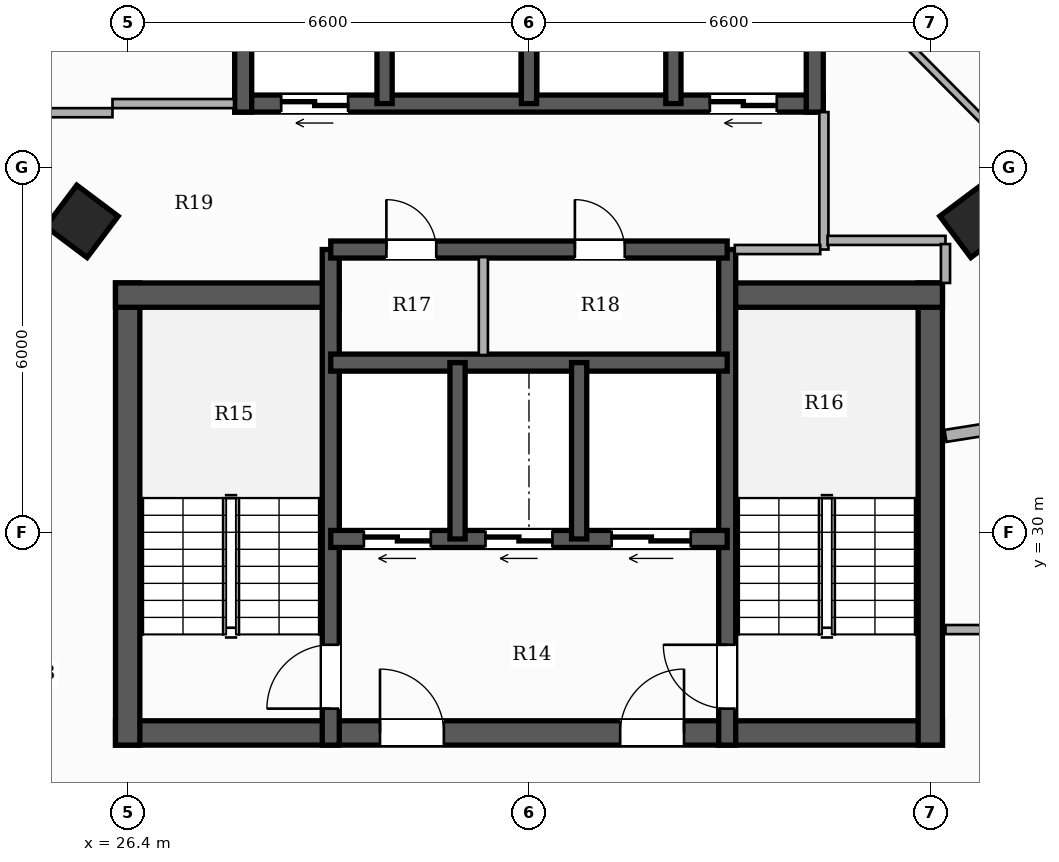
"""IFC4 building model, lengths in metres.
Left out: names, types, materials, properties, quantities, classifications, styles, units other than length and angle.
Written with IfcOpenShell. Run it as: python <this file> out.ifc"""

import sys

from ifc_helpers import new_model, si_unit, direction, frame, frame_2d, origin, origin_2d, place, context, subcontext, project, spatial, rectangle, hollow_rectangle, extrude, element, fill, save


model = new_model("IFC4")
c1 = context("Model", 3, precision=1e-05, world=origin(), true_north=direction((0.0, 1.0)))
c2 = subcontext(c1, "Body", "Model", "MODEL_VIEW")
j1 = project(units=[si_unit("LENGTHUNIT", "METRE"), si_unit("PLANEANGLEUNIT", "RADIAN")], contexts=[c1])
p1 = place(None, origin())
s1 = spatial("IfcSite", under=j1, at=p1, CompositionType="ELEMENT")
p2 = place(p1, origin())
s2 = spatial("IfcBuilding", under=s1, at=p2, CompositionType="ELEMENT")
p3 = place(p2, frame((0.0, 0.0, 119.9)))
s3 = spatial("IfcBuildingStorey", under=s2, at=p3, CompositionType="ELEMENT", Elevation=119.9)
p4 = place(p3, frame((26.2, 26.7, 0.0), z_axis=(0.0, 0.0, 1.0), x_axis=(1.0, 0.0, 0.0)))
e1 = element("IfcWall", 1, at=p4, inside=s3, PredefinedType="SHEAR", context=c2, shape_type="SweptSolid", body=[
    extrude(rectangle(XDim=13.6, YDim=0.4, at=frame_2d((6.8, 0.0))), origin(), (0.0, 0.0, 1.0), 3.3),
])
p5 = place(p4, frame((4.35, 0.0, 0.0)))
e2 = element("IfcOpeningElement", 2, at=p5, cuts=e1, PredefinedType="OPENING", context=c2, shape_type="SweptSolid", body=[
    extrude(rectangle(XDim=1.05, YDim=2.15, at=frame_2d((0.525, 1.075))), frame((0.0, 0.21, 0.0), z_axis=(0.0, -1.0, 0.0), x_axis=(1.0, 0.0, 0.0)), (0.0, 0.0, 1.0), 0.42),
])
p6 = place(p4, frame((8.3, 0.0, 0.0)))
e3 = element("IfcOpeningElement", 3, at=p6, cuts=e1, PredefinedType="OPENING", context=c2, shape_type="SweptSolid", body=[
    extrude(rectangle(XDim=1.05, YDim=2.15, at=frame_2d((0.525, 1.075))), frame((0.0, 0.21, 0.0), z_axis=(0.0, -1.0, 0.0), x_axis=(1.0, 0.0, 0.0)), (0.0, 0.0, 1.0), 0.42),
])
p7 = place(p3, frame((26.4, 26.5, 0.0), z_axis=(0.0, 0.0, 1.0), x_axis=(0.0, 1.0, 0.0)))
e4 = element("IfcWall", 4, at=p7, inside=s3, PredefinedType="SHEAR", context=c2, shape_type="SweptSolid", body=[
    extrude(rectangle(XDim=7.6, YDim=0.4, at=frame_2d((3.8, 0.0))), origin(), (0.0, 0.0, 1.0), 3.3),
])
p8 = place(p3, frame((26.2, 33.9, 0.0), z_axis=(0.0, 0.0, 1.0), x_axis=(1.0, 0.0, 0.0)))
e5 = element("IfcWall", 5, at=p8, inside=s3, PredefinedType="SHEAR", context=c2, shape_type="SweptSolid", body=[
    extrude(rectangle(XDim=3.68, YDim=0.4, at=frame_2d((1.84, 0.0))), origin(), (0.0, 0.0, 1.0), 3.3),
])
p9 = place(p3, frame((39.6, 26.5, 0.0), z_axis=(0.0, 0.0, 1.0), x_axis=(0.0, 1.0, 0.0)))
e6 = element("IfcWall", 6, at=p9, inside=s3, PredefinedType="SHEAR", context=c2, shape_type="SweptSolid", body=[
    extrude(rectangle(XDim=7.6, YDim=0.4, at=frame_2d((3.8, 0.0))), origin(), (0.0, 0.0, 1.0), 3.3),
])
p10 = place(p3, frame((36.12, 33.9, 0.0), z_axis=(0.0, 0.0, 1.0), x_axis=(1.0, 0.0, 0.0)))
e7 = element("IfcWall", 7, at=p10, inside=s3, PredefinedType="SHEAR", context=c2, shape_type="SweptSolid", body=[
    extrude(rectangle(XDim=3.68, YDim=0.4, at=frame_2d((1.84, 0.0))), origin(), (0.0, 0.0, 1.0), 3.3),
])
p11 = place(p3, frame((29.74, 26.5, 0.0), z_axis=(0.0, 0.0, 1.0), x_axis=(0.0, 1.0, 0.0)))
e8 = element("IfcWall", 8, at=p11, inside=s3, PredefinedType="SHEAR", context=c2, shape_type="SweptSolid", body=[
    extrude(rectangle(XDim=8.15, YDim=0.28, at=frame_2d((4.075, 0.0))), origin(), (0.0, 0.0, 1.0), 3.3),
])
p12 = place(p11, frame((0.6, 0.0, 0.0)))
e9 = element("IfcOpeningElement", 9, at=p12, cuts=e8, PredefinedType="OPENING", context=c2, shape_type="SweptSolid", body=[
    extrude(rectangle(XDim=1.05, YDim=2.15, at=frame_2d((0.525, 1.075))), frame((0.0, 0.15, 0.0), z_axis=(0.0, -1.0, 0.0), x_axis=(1.0, 0.0, 0.0)), (0.0, 0.0, 1.0), 0.3),
])
p13 = place(p3, frame((36.26, 26.5, 0.0), z_axis=(0.0, 0.0, 1.0), x_axis=(0.0, 1.0, 0.0)))
e10 = element("IfcWall", 10, at=p13, inside=s3, PredefinedType="SHEAR", context=c2, shape_type="SweptSolid", body=[
    extrude(rectangle(XDim=8.15, YDim=0.28, at=frame_2d((4.075, 0.0))), origin(), (0.0, 0.0, 1.0), 3.3),
])
p14 = place(p13, frame((0.6, 0.0, 0.0)))
e11 = element("IfcOpeningElement", 11, at=p14, cuts=e10, PredefinedType="OPENING", context=c2, shape_type="SweptSolid", body=[
    extrude(rectangle(XDim=1.05, YDim=2.15, at=frame_2d((0.525, 1.075))), frame((0.0, 0.15, 0.0), z_axis=(0.0, -1.0, 0.0), x_axis=(1.0, 0.0, 0.0)), (0.0, 0.0, 1.0), 0.3),
])
p15 = place(p3, frame((36.26, 29.89, 0.0), z_axis=(0.0, 0.0, 1.0), x_axis=(-1.0, 0.0, 0.0)))
e12 = element("IfcWall", 12, at=p15, inside=s3, PredefinedType="SHEAR", context=c2, shape_type="SweptSolid", body=[
    extrude(rectangle(XDim=6.52, YDim=0.28, at=frame_2d((3.26, 0.0))), origin(), (0.0, 0.0, 1.0), 3.3),
])
p16 = place(p15, frame((4.875, 0.0, 0.0)))
e13 = element("IfcOpeningElement", 13, at=p16, cuts=e12, PredefinedType="OPENING", context=c2, shape_type="SweptSolid", body=[
    extrude(rectangle(XDim=1.1, YDim=2.2, at=frame_2d((0.55, 1.1))), frame((0.0, 0.15, 0.0), z_axis=(0.0, -1.0, 0.0), x_axis=(1.0, 0.0, 0.0)), (0.0, 0.0, 1.0), 0.3),
])
p17 = place(p15, frame((2.875, 0.0, 0.0)))
e14 = element("IfcOpeningElement", 14, at=p17, cuts=e12, PredefinedType="OPENING", context=c2, shape_type="SweptSolid", body=[
    extrude(rectangle(XDim=1.1, YDim=2.2, at=frame_2d((0.55, 1.1))), frame((0.0, 0.15, 0.0), z_axis=(0.0, -1.0, 0.0), x_axis=(1.0, 0.0, 0.0)), (0.0, 0.0, 1.0), 0.3),
])
p18 = place(p15, frame((0.6, 0.0, 0.0)))
e15 = element("IfcOpeningElement", 15, at=p18, cuts=e12, PredefinedType="OPENING", context=c2, shape_type="SweptSolid", body=[
    extrude(rectangle(XDim=1.3, YDim=2.2, at=frame_2d((0.65, 1.1))), frame((0.0, 0.15, 0.0), z_axis=(0.0, -1.0, 0.0), x_axis=(1.0, 0.0, 0.0)), (0.0, 0.0, 1.0), 0.3),
])
p19 = place(p3, frame((29.74, 32.79, 0.0), z_axis=(0.0, 0.0, 1.0), x_axis=(1.0, 0.0, 0.0)))
e16 = element("IfcWall", 16, at=p19, inside=s3, PredefinedType="SHEAR", context=c2, shape_type="SweptSolid", body=[
    extrude(rectangle(XDim=6.52, YDim=0.28, at=frame_2d((3.26, 0.0))), origin(), (0.0, 0.0, 1.0), 3.3),
])
for number, where, z_axis, x_axis in (
    (17, (31.825, 29.89, 0.0), (0.0, 0.0, 1.0), (0.0, 1.0, 0.0)),
    (18, (33.825, 29.89, 0.0), (0.0, 0.0, 1.0), (0.0, 1.0, 0.0)),
):
    element("IfcWall", number, at=place(p3, frame(where, z_axis=z_axis, x_axis=x_axis)), inside=s3, PredefinedType="SHEAR", context=c2, shape_type="SweptSolid", body=[
        extrude(rectangle(XDim=2.9, YDim=0.25, at=frame_2d((1.45, 0.0))), origin(), (0.0, 0.0, 1.0), 3.3),
    ])
p20 = place(p3, frame((29.74, 34.65, 0.0), z_axis=(0.0, 0.0, 1.0), x_axis=(1.0, 0.0, 0.0)))
e19 = element("IfcWall", 19, at=p20, inside=s3, PredefinedType="SHEAR", context=c2, shape_type="SweptSolid", body=[
    extrude(rectangle(XDim=6.52, YDim=0.28, at=frame_2d((3.26, 0.0))), origin(), (0.0, 0.0, 1.0), 3.3),
])
p21 = place(p20, frame((0.915, 0.0, 0.0)))
e20 = element("IfcOpeningElement", 20, at=p21, cuts=e19, PredefinedType="OPENING", context=c2, shape_type="SweptSolid", body=[
    extrude(rectangle(XDim=0.82, YDim=2.1, at=frame_2d((0.41, 1.05))), frame((0.0, 0.15, 0.0), z_axis=(0.0, -1.0, 0.0), x_axis=(1.0, 0.0, 0.0)), (0.0, 0.0, 1.0), 0.3),
])
p22 = place(p20, frame((4.015, 0.0, 0.0)))
e21 = element("IfcOpeningElement", 21, at=p22, cuts=e19, PredefinedType="OPENING", context=c2, shape_type="SweptSolid", body=[
    extrude(rectangle(XDim=0.82, YDim=2.1, at=frame_2d((0.41, 1.05))), frame((0.0, 0.15, 0.0), z_axis=(0.0, -1.0, 0.0), x_axis=(1.0, 0.0, 0.0)), (0.0, 0.0, 1.0), 0.3),
])
p23 = place(p3, frame((37.84, 37.05, 0.0), z_axis=(0.0, 0.0, 1.0), x_axis=(-1.0, 0.0, 0.0)))
e22 = element("IfcWall", 22, at=p23, inside=s3, PredefinedType="SHEAR", context=c2, shape_type="SweptSolid", body=[
    extrude(rectangle(XDim=9.68, YDim=0.28, at=frame_2d((4.84, 0.0))), origin(), (0.0, 0.0, 1.0), 3.3),
])
p24 = place(p23, frame((7.815, 0.0, 0.0)))
e23 = element("IfcOpeningElement", 23, at=p24, cuts=e22, PredefinedType="OPENING", context=c2, shape_type="SweptSolid", body=[
    extrude(rectangle(XDim=1.1, YDim=2.2, at=frame_2d((0.55, 1.1))), frame((0.0, 0.15, 0.0), z_axis=(0.0, -1.0, 0.0), x_axis=(1.0, 0.0, 0.0)), (0.0, 0.0, 1.0), 0.3),
])
p25 = place(p23, frame((0.765, 0.0, 0.0)))
e24 = element("IfcOpeningElement", 24, at=p25, cuts=e22, PredefinedType="OPENING", context=c2, shape_type="SweptSolid", body=[
    extrude(rectangle(XDim=1.1, YDim=2.2, at=frame_2d((0.55, 1.1))), frame((0.0, 0.15, 0.0), z_axis=(0.0, -1.0, 0.0), x_axis=(1.0, 0.0, 0.0)), (0.0, 0.0, 1.0), 0.3),
])
for number, where, z_axis, x_axis in (
    (25, (28.3, 36.91, 0.0), (0.0, 0.0, 1.0), (0.0, 1.0, 0.0)),
    (26, (37.7, 36.91, 0.0), (0.0, 0.0, 1.0), (0.0, 1.0, 0.0)),
):
    element("IfcWall", number, at=place(p3, frame(where, z_axis=z_axis, x_axis=x_axis)), inside=s3, PredefinedType="SHEAR", context=c2, shape_type="SweptSolid", body=[
        extrude(rectangle(XDim=2.83, YDim=0.28, at=frame_2d((1.415, 0.0))), origin(), (0.0, 0.0, 1.0), 3.3),
    ])
for number, where, z_axis, x_axis in (
    (27, (30.625, 37.05, 0.0), (0.0, 0.0, 1.0), (0.0, 1.0, 0.0)),
    (28, (33.0, 37.05, 0.0), (0.0, 0.0, 1.0), (0.0, 1.0, 0.0)),
    (29, (35.375, 37.05, 0.0), (0.0, 0.0, 1.0), (0.0, 1.0, 0.0)),
):
    element("IfcWall", number, at=place(p3, frame(where, z_axis=z_axis, x_axis=x_axis)), inside=s3, PredefinedType="SHEAR", context=c2, shape_type="SweptSolid", body=[
        extrude(rectangle(XDim=2.55, YDim=0.25, at=frame_2d((1.275, 0.0))), origin(), (0.0, 0.0, 1.0), 3.3),
    ])
for number, where, z_axis, x_axis in (
    (30, (25.648, 35.113, 0.0), (0.0, 0.0, 1.0), (0.6, 0.8, 0.0)),
    (31, (40.352, 35.113, 0.0), (0.0, 0.0, 1.0), (-0.6, 0.8, 0.0)),
):
    element("IfcColumn", number, at=place(p3, frame(where, z_axis=z_axis, x_axis=x_axis)), inside=s3, PredefinedType="COLUMN", context=c2, shape_type="SweptSolid", body=[
        extrude(hollow_rectangle(XDim=0.85, YDim=0.85, WallThickness=0.028, at=origin_2d()), origin(), (0.0, 0.0, 1.0), 3.3),
    ])
p26 = place(p3, frame((37.85, 34.65, 0.0), z_axis=(0.0, 0.0, 1.0), x_axis=(0.0, 1.0, 0.0)))
e32 = element("IfcWall", 32, at=p26, inside=s3, PredefinedType="PARTITIONING", context=c2, shape_type="SweptSolid", body=[
    extrude(rectangle(XDim=2.26, YDim=0.15, at=frame_2d((1.13, 0.0))), origin(), (0.0, 0.0, 1.0), 3.06),
])
p27 = place(p3, frame((36.385, 34.65, 0.0), z_axis=(0.0, 0.0, 1.0), x_axis=(1.0, 0.0, 0.0)))
e33 = element("IfcWall", 33, at=p27, inside=s3, PredefinedType="PARTITIONING", context=c2, shape_type="SweptSolid", body=[
    extrude(rectangle(XDim=1.405, YDim=0.15, at=frame_2d((0.703, 0.0))), origin(), (0.0, 0.0, 1.0), 2.425),
])
p28 = place(p3, frame((32.25, 32.915, 0.0), z_axis=(0.0, 0.0, 1.0), x_axis=(0.0, 1.0, 0.0)))
e34 = element("IfcWall", 34, at=p28, inside=s3, PredefinedType="PARTITIONING", context=c2, shape_type="SweptSolid", body=[
    extrude(rectangle(XDim=1.61, YDim=0.15, at=frame_2d((0.805, 0.0))), origin(), (0.0, 0.0, 1.0), 3.06),
])
p29 = place(p3, frame((23.56, 36.9, 0.0), z_axis=(0.0, 0.0, 1.0), x_axis=(1.0, 0.0, 0.0)))
e35 = element("IfcWall", 35, at=p29, inside=s3, PredefinedType="PARTITIONING", context=c2, shape_type="SweptSolid", body=[
    extrude(rectangle(XDim=2.59, YDim=0.15, at=frame_2d((1.295, 0.0))), origin(), (0.0, 0.0, 1.0), 2.413),
])
p30 = place(p29, frame((0.414, 0.0, 0.0)))
e36 = element("IfcOpeningElement", 36, at=p30, cuts=e35, PredefinedType="OPENING", context=c2, shape_type="SweptSolid", body=[
    extrude(rectangle(XDim=0.92, YDim=2.15, at=frame_2d((0.46, 1.075))), frame((0.0, 0.085, 0.0), z_axis=(0.0, -1.0, 0.0), x_axis=(1.0, 0.0, 0.0)), (0.0, 0.0, 1.0), 0.17),
])
p31 = place(p3, frame((39.85, 28.4, 0.0), z_axis=(0.0, 0.0, 1.0), x_axis=(1.0, 0.0, 0.0)))
e37 = element("IfcWall", 37, at=p31, inside=s3, PredefinedType="PARTITIONING", context=c2, shape_type="SweptSolid", body=[
    extrude(rectangle(XDim=2.5, YDim=0.15, at=frame_2d((1.25, 0.0))), origin(), (0.0, 0.0, 1.0), 2.721),
])
p32 = place(p3, frame((26.15, 37.05, 0.0), z_axis=(0.0, 0.0, 1.0), x_axis=(1.0, 0.0, 0.0)))
e38 = element("IfcWall", 38, at=p32, inside=s3, PredefinedType="PARTITIONING", context=c2, shape_type="SweptSolid", body=[
    extrude(rectangle(XDim=2.0, YDim=0.15, at=frame_2d((1.0, 0.0))), origin(), (0.0, 0.0, 1.0), 2.413),
])
p33 = place(p3, frame((37.91, 34.8, 0.0), z_axis=(0.0, 0.0, 1.0), x_axis=(1.0, 0.0, 0.0)))
e39 = element("IfcWall", 39, at=p33, inside=s3, PredefinedType="PARTITIONING", context=c2, shape_type="SweptSolid", body=[
    extrude(rectangle(XDim=1.94, YDim=0.15, at=frame_2d((0.97, 0.0))), origin(), (0.0, 0.0, 1.0), 2.721),
])
p34 = place(p3, frame((39.85, 34.74, 0.0), z_axis=(0.0, 0.0, 1.0), x_axis=(0.0, -1.0, 0.0)))
e40 = element("IfcWall", 40, at=p34, inside=s3, PredefinedType="PARTITIONING", context=c2, shape_type="SweptSolid", body=[
    extrude(rectangle(XDim=0.64, YDim=0.15, at=frame_2d((0.32, 0.0))), origin(), (0.0, 0.0, 1.0), 2.721),
])
p35 = place(p3, frame((46.976, 32.714, 0.0), z_axis=(0.0, 0.0, 1.0), x_axis=(-0.987677489662, -0.156502959767, 0.0)))
e41 = element("IfcWall", 41, at=p35, inside=s3, PredefinedType="PARTITIONING", context=c2, shape_type="SweptSolid", body=[
    extrude(rectangle(XDim=7.215, YDim=0.2, at=frame_2d((3.607, 0.0))), origin(), (0.0, 0.0, 1.0), 2.413),
])
p36 = place(p3, frame((39.203, 38.043, 0.0), z_axis=(0.0, 0.0, 1.0), x_axis=(0.704889894519, -0.709316739267, 0.0)))
e42 = element("IfcWall", 42, at=p36, inside=s3, PredefinedType="PARTITIONING", context=c2, shape_type="SweptSolid", body=[
    extrude(rectangle(XDim=7.886, YDim=0.12, at=frame_2d((3.943, 0.0))), origin(), (0.0, 0.0, 1.0), 2.413),
])
p37 = place(p36, frame((3.78, 0.0, 0.0)))
e43 = element("IfcOpeningElement", 43, at=p37, cuts=e42, PredefinedType="OPENING", context=c2, shape_type="SweptSolid", body=[
    extrude(rectangle(XDim=0.82, YDim=2.1, at=frame_2d((0.41, 1.05))), frame((0.0, 0.07, 0.0), z_axis=(0.0, -1.0, 0.0), x_axis=(1.0, 0.0, 0.0)), (0.0, 0.0, 1.0), 0.14),
])
p38 = place(p12, origin())
e44 = element("IfcDoor", 44, at=p38, inside=s3, OperationType="SINGLE_SWING_LEFT", PredefinedType="DOOR", context=c2, shape_type="SweptSolid", body=[
    extrude(rectangle(XDim=1.05, YDim=2.15, at=frame_2d((0.525, 1.075))), frame((0.0, 0.025, 0.0), z_axis=(0.0, -1.0, 0.0), x_axis=(1.0, 0.0, 0.0)), (0.0, 0.0, 1.0), 0.05),
])
fill(e9, e44)
p39 = place(p14, origin())
e45 = element("IfcDoor", 45, at=p39, inside=s3, OperationType="SINGLE_SWING_RIGHT", PredefinedType="DOOR", context=c2, shape_type="SweptSolid", body=[
    extrude(rectangle(XDim=1.05, YDim=2.15, at=frame_2d((0.525, 1.075))), frame((0.0, 0.025, 0.0), z_axis=(0.0, -1.0, 0.0), x_axis=(1.0, 0.0, 0.0)), (0.0, 0.0, 1.0), 0.05),
])
fill(e11, e45)
p40 = place(p5, origin())
e46 = element("IfcDoor", 46, at=p40, inside=s3, OperationType="SINGLE_SWING_LEFT", PredefinedType="DOOR", context=c2, shape_type="SweptSolid", body=[
    extrude(rectangle(XDim=1.05, YDim=2.15, at=frame_2d((0.525, 1.075))), frame((0.0, 0.025, 0.0), z_axis=(0.0, -1.0, 0.0), x_axis=(1.0, 0.0, 0.0)), (0.0, 0.0, 1.0), 0.05),
])
fill(e2, e46)
p41 = place(p6, origin())
e47 = element("IfcDoor", 47, at=p41, inside=s3, OperationType="SINGLE_SWING_RIGHT", PredefinedType="DOOR", context=c2, shape_type="SweptSolid", body=[
    extrude(rectangle(XDim=1.05, YDim=2.15, at=frame_2d((0.525, 1.075))), frame((0.0, 0.025, 0.0), z_axis=(0.0, -1.0, 0.0), x_axis=(1.0, 0.0, 0.0)), (0.0, 0.0, 1.0), 0.05),
])
fill(e3, e47)
p42 = place(p16, origin())
e48 = element("IfcDoor", 48, at=p42, inside=s3, OperationType="DOUBLE_DOOR_SLIDING", PredefinedType="DOOR", context=c2, shape_type="SweptSolid", body=[
    extrude(rectangle(XDim=1.1, YDim=2.2, at=frame_2d((0.55, 1.1))), frame((0.0, 0.025, 0.0), z_axis=(0.0, -1.0, 0.0), x_axis=(1.0, 0.0, 0.0)), (0.0, 0.0, 1.0), 0.05),
])
fill(e13, e48)
p43 = place(p17, origin())
e49 = element("IfcDoor", 49, at=p43, inside=s3, OperationType="DOUBLE_DOOR_SLIDING", PredefinedType="DOOR", context=c2, shape_type="SweptSolid", body=[
    extrude(rectangle(XDim=1.1, YDim=2.2, at=frame_2d((0.55, 1.1))), frame((0.0, 0.025, 0.0), z_axis=(0.0, -1.0, 0.0), x_axis=(1.0, 0.0, 0.0)), (0.0, 0.0, 1.0), 0.05),
])
fill(e14, e49)
p44 = place(p18, origin())
e50 = element("IfcDoor", 50, at=p44, inside=s3, OperationType="DOUBLE_DOOR_SLIDING", PredefinedType="DOOR", context=c2, shape_type="SweptSolid", body=[
    extrude(rectangle(XDim=1.3, YDim=2.2, at=frame_2d((0.65, 1.1))), frame((0.0, 0.025, 0.0), z_axis=(0.0, -1.0, 0.0), x_axis=(1.0, 0.0, 0.0)), (0.0, 0.0, 1.0), 0.05),
])
fill(e15, e50)
p45 = place(p24, origin())
e51 = element("IfcDoor", 51, at=p45, inside=s3, OperationType="DOUBLE_DOOR_SLIDING", PredefinedType="DOOR", context=c2, shape_type="SweptSolid", body=[
    extrude(rectangle(XDim=1.1, YDim=2.2, at=frame_2d((0.55, 1.1))), frame((0.0, 0.025, 0.0), z_axis=(0.0, -1.0, 0.0), x_axis=(1.0, 0.0, 0.0)), (0.0, 0.0, 1.0), 0.05),
])
fill(e23, e51)
p46 = place(p25, origin())
e52 = element("IfcDoor", 52, at=p46, inside=s3, OperationType="DOUBLE_DOOR_SLIDING", PredefinedType="DOOR", context=c2, shape_type="SweptSolid", body=[
    extrude(rectangle(XDim=1.1, YDim=2.2, at=frame_2d((0.55, 1.1))), frame((0.0, 0.025, 0.0), z_axis=(0.0, -1.0, 0.0), x_axis=(1.0, 0.0, 0.0)), (0.0, 0.0, 1.0), 0.05),
])
fill(e24, e52)
p47 = place(p21, origin())
e53 = element("IfcDoor", 53, at=p47, inside=s3, OperationType="SINGLE_SWING_LEFT", PredefinedType="DOOR", context=c2, shape_type="SweptSolid", body=[
    extrude(rectangle(XDim=0.82, YDim=2.1, at=frame_2d((0.41, 1.05))), frame((0.0, 0.025, 0.0), z_axis=(0.0, -1.0, 0.0), x_axis=(1.0, 0.0, 0.0)), (0.0, 0.0, 1.0), 0.05),
])
fill(e20, e53)
p48 = place(p22, origin())
e54 = element("IfcDoor", 54, at=p48, inside=s3, OperationType="SINGLE_SWING_LEFT", PredefinedType="DOOR", context=c2, shape_type="SweptSolid", body=[
    extrude(rectangle(XDim=0.82, YDim=2.1, at=frame_2d((0.41, 1.05))), frame((0.0, 0.025, 0.0), z_axis=(0.0, -1.0, 0.0), x_axis=(1.0, 0.0, 0.0)), (0.0, 0.0, 1.0), 0.05),
])
fill(e21, e54)
save(model, sys.argv[1])
